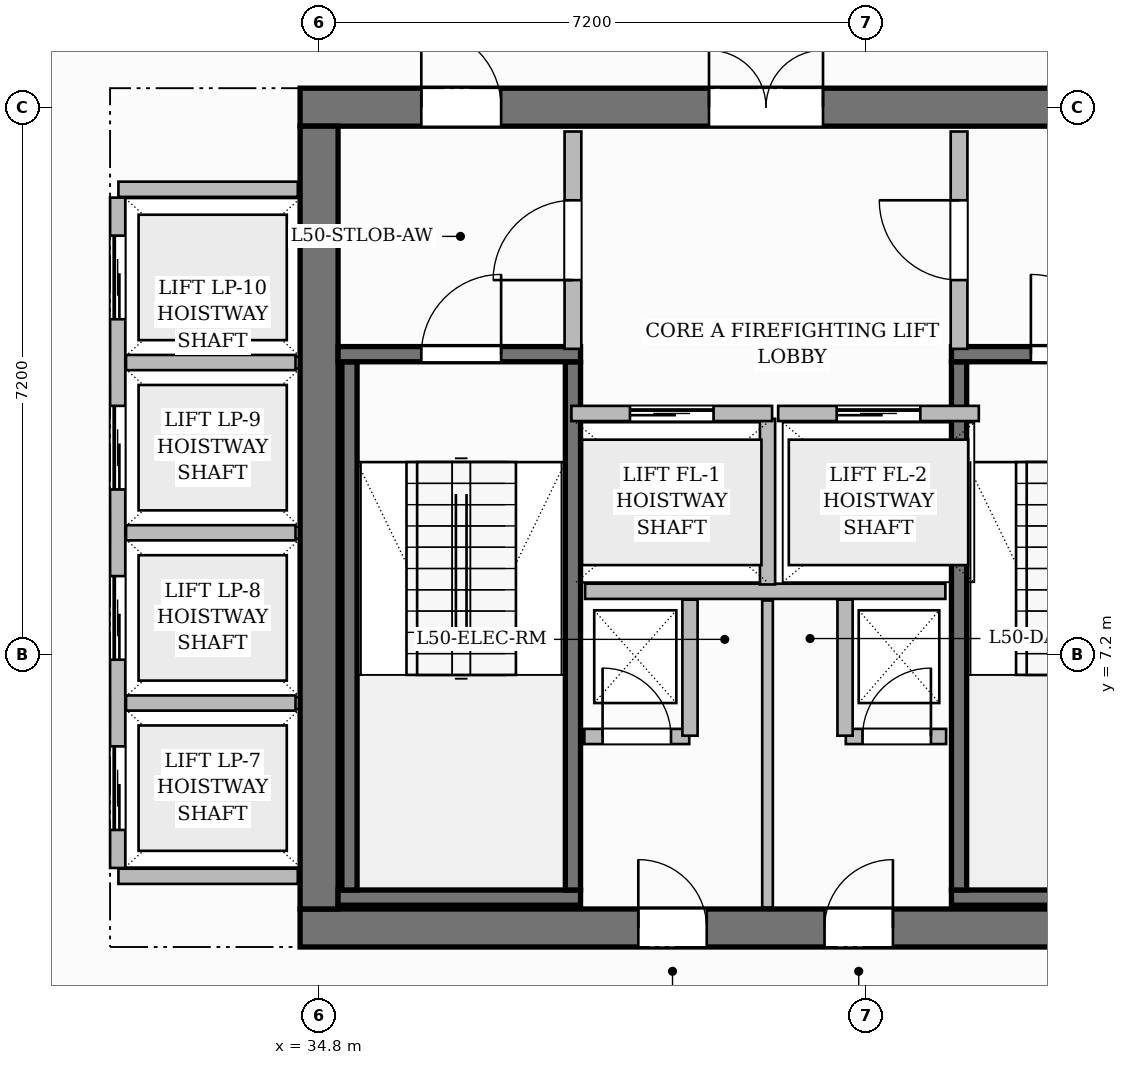
"""IFC4 building model, lengths in metres.
Left out: names, types, materials, properties, quantities, classifications, styles, units other than length and angle.
Written with IfcOpenShell. Run it as: python <this file> out.ifc"""

import sys

from ifc_helpers import new_model, si_unit, direction, frame, frame_2d, origin, place, context, subcontext, project, spatial, rectangle, extrude, source, transform, mapped, element, fill, save


model = new_model("IFC4")
c1 = context("Model", 3, precision=1e-05, world=origin(), true_north=direction((0.0, 1.0)))
c2 = subcontext(c1, "Body", "Model", "MODEL_VIEW")
j1 = project(units=[si_unit("LENGTHUNIT", "METRE"), si_unit("PLANEANGLEUNIT", "RADIAN")], contexts=[c1])
p1 = place(None, origin())
s1 = spatial("IfcSite", under=j1, at=p1, CompositionType="ELEMENT")
p2 = place(p1, origin())
s2 = spatial("IfcBuilding", under=s1, at=p2, CompositionType="ELEMENT")
p3 = place(p2, frame((0.0, 0.0, 201.9)))
s3 = spatial("IfcBuildingStorey", under=s2, at=p3, CompositionType="ELEMENT", Elevation=201.9)
p4 = place(p3, frame((34.55, 3.6, 0.0), z_axis=(0.0, 0.0, 1.0), x_axis=(1.0, 0.0, 0.0)))
e1 = element("IfcWall", 1, at=p4, inside=s3, PredefinedType="SHEAR", context=c2, shape_type="SweptSolid", body=[
    extrude(rectangle(XDim=15.5, YDim=0.5, at=frame_2d((7.75, 0.0))), origin(), (0.0, 0.0, 1.0), 3.85),
])
p5 = place(p4, frame((4.45, 0.0, 0.0)))
e2 = element("IfcOpeningElement", 2, at=p5, cuts=e1, PredefinedType="OPENING", context=c2, shape_type="SweptSolid", body=[
    extrude(rectangle(XDim=0.9, YDim=2.1, at=frame_2d((0.45, 1.05))), frame((0.0, 0.26, 0.0), z_axis=(0.0, -1.0, 0.0), x_axis=(1.0, 0.0, 0.0)), (0.0, 0.0, 1.0), 0.52),
])
p6 = place(p4, frame((6.9, 0.0, 0.0)))
e3 = element("IfcOpeningElement", 3, at=p6, cuts=e1, PredefinedType="OPENING", context=c2, shape_type="SweptSolid", body=[
    extrude(rectangle(XDim=0.9, YDim=2.1, at=frame_2d((0.45, 1.05))), frame((0.0, 0.26, 0.0), z_axis=(0.0, -1.0, 0.0), x_axis=(1.0, 0.0, 0.0)), (0.0, 0.0, 1.0), 0.52),
])
p7 = place(p3, frame((34.55, 14.4, 0.0), z_axis=(0.0, 0.0, 1.0), x_axis=(1.0, 0.0, 0.0)))
e4 = element("IfcWall", 4, at=p7, inside=s3, PredefinedType="SHEAR", context=c2, shape_type="SweptSolid", body=[
    extrude(rectangle(XDim=15.5, YDim=0.5, at=frame_2d((7.75, 0.0))), origin(), (0.0, 0.0, 1.0), 3.85),
])
p8 = place(p7, frame((5.38, 0.0, 0.0)))
e5 = element("IfcOpeningElement", 5, at=p8, cuts=e4, PredefinedType="OPENING", context=c2, shape_type="SweptSolid", body=[
    extrude(rectangle(XDim=1.5, YDim=2.2, at=frame_2d((0.75, 1.1))), frame((0.0, 0.26, 0.0), z_axis=(0.0, -1.0, 0.0), x_axis=(1.0, 0.0, 0.0)), (0.0, 0.0, 1.0), 0.52),
])
p9 = place(p7, frame((1.595, 0.0, 0.0)))
e6 = element("IfcOpeningElement", 6, at=p9, cuts=e4, PredefinedType="OPENING", context=c2, shape_type="SweptSolid", body=[
    extrude(rectangle(XDim=1.05, YDim=2.15, at=frame_2d((0.525, 1.075))), frame((0.0, 0.26, 0.0), z_axis=(0.0, -1.0, 0.0), x_axis=(1.0, 0.0, 0.0)), (0.0, 0.0, 1.0), 0.52),
])
p10 = place(p7, frame((11.225, 0.0, 0.0)))
e7 = element("IfcOpeningElement", 7, at=p10, cuts=e4, PredefinedType="OPENING", context=c2, shape_type="SweptSolid", body=[
    extrude(rectangle(XDim=1.05, YDim=2.15, at=frame_2d((0.525, 1.075))), frame((0.0, 0.26, 0.0), z_axis=(0.0, -1.0, 0.0), x_axis=(1.0, 0.0, 0.0)), (0.0, 0.0, 1.0), 0.52),
])
p11 = place(p3, frame((34.8, 3.85, 0.0), z_axis=(0.0, 0.0, 1.0), x_axis=(0.0, 1.0, 0.0)))
e8 = element("IfcWall", 8, at=p11, inside=s3, PredefinedType="SHEAR", context=c2, shape_type="SweptSolid", body=[
    extrude(rectangle(XDim=10.3, YDim=0.5, at=frame_2d((5.15, 0.0))), origin(), (0.0, 0.0, 1.0), 3.85),
])
p12 = place(p3, frame((35.05, 4.0, 0.0), z_axis=(0.0, 0.0, 1.0), x_axis=(1.0, 0.0, 0.0)))
e9 = element("IfcWall", 9, at=p12, inside=s3, PredefinedType="SHEAR", context=c2, shape_type="SweptSolid", body=[
    extrude(rectangle(XDim=3.19, YDim=0.2, at=frame_2d((1.595, 0.0))), origin(), (0.0, 0.0, 1.0), 3.85),
])
for number, where, z_axis, x_axis in (
    (10, (35.2, 4.1, 0.0), (0.0, 0.0, 1.0), (0.0, 1.0, 0.0)),
    (11, (38.14, 4.1, 0.0), (0.0, 0.0, 1.0), (0.0, 1.0, 0.0)),
):
    element("IfcWall", number, at=place(p3, frame(where, z_axis=z_axis, x_axis=x_axis)), inside=s3, PredefinedType="SHEAR", context=c2, shape_type="SweptSolid", body=[
        extrude(rectangle(XDim=6.95, YDim=0.2, at=frame_2d((3.475, 0.0))), origin(), (0.0, 0.0, 1.0), 3.85),
    ])
p13 = place(p3, frame((35.05, 11.15, 0.0), z_axis=(0.0, 0.0, 1.0), x_axis=(1.0, 0.0, 0.0)))
e12 = element("IfcWall", 12, at=p13, inside=s3, PredefinedType="SHEAR", context=c2, shape_type="SweptSolid", body=[
    extrude(rectangle(XDim=3.19, YDim=0.2, at=frame_2d((1.595, 0.0))), origin(), (0.0, 0.0, 1.0), 3.85),
])
p14 = place(p13, frame((1.095, 0.0, 0.0)))
e13 = element("IfcOpeningElement", 13, at=p14, cuts=e12, PredefinedType="OPENING", context=c2, shape_type="SweptSolid", body=[
    extrude(rectangle(XDim=1.05, YDim=2.2, at=frame_2d((0.525, 1.1))), frame((0.0, 0.11, 0.0), z_axis=(0.0, -1.0, 0.0), x_axis=(1.0, 0.0, 0.0)), (0.0, 0.0, 1.0), 0.22),
])
p15 = place(p3, frame((43.12, 4.0, 0.0), z_axis=(0.0, 0.0, 1.0), x_axis=(1.0, 0.0, 0.0)))
e14 = element("IfcWall", 14, at=p15, inside=s3, PredefinedType="SHEAR", context=c2, shape_type="SweptSolid", body=[
    extrude(rectangle(XDim=6.43, YDim=0.2, at=frame_2d((3.215, 0.0))), origin(), (0.0, 0.0, 1.0), 3.85),
])
p16 = place(p3, frame((43.22, 4.1, 0.0), z_axis=(0.0, 0.0, 1.0), x_axis=(0.0, 1.0, 0.0)))
e15 = element("IfcWall", 15, at=p16, inside=s3, PredefinedType="SHEAR", context=c2, shape_type="SweptSolid", body=[
    extrude(rectangle(XDim=6.95, YDim=0.2, at=frame_2d((3.475, 0.0))), origin(), (0.0, 0.0, 1.0), 3.85),
])
p17 = place(p3, frame((43.12, 11.15, 0.0), z_axis=(0.0, 0.0, 1.0), x_axis=(1.0, 0.0, 0.0)))
e16 = element("IfcWall", 16, at=p17, inside=s3, PredefinedType="SHEAR", context=c2, shape_type="SweptSolid", body=[
    extrude(rectangle(XDim=6.43, YDim=0.2, at=frame_2d((3.215, 0.0))), origin(), (0.0, 0.0, 1.0), 3.85),
])
p18 = place(p17, frame((1.045, 0.0, 0.0)))
e17 = element("IfcOpeningElement", 17, at=p18, cuts=e16, PredefinedType="OPENING", context=c2, shape_type="SweptSolid", body=[
    extrude(rectangle(XDim=1.05, YDim=2.2, at=frame_2d((0.525, 1.1))), frame((0.0, 0.11, 0.0), z_axis=(0.0, -1.0, 0.0), x_axis=(1.0, 0.0, 0.0)), (0.0, 0.0, 1.0), 0.22),
])
p19 = place(p17, frame((4.125, 0.0, 0.0)))
e18 = element("IfcOpeningElement", 18, at=p19, cuts=e16, PredefinedType="OPENING", context=c2, shape_type="SweptSolid", body=[
    extrude(rectangle(XDim=1.05, YDim=2.2, at=frame_2d((0.525, 1.1))), frame((0.0, 0.11, 0.0), z_axis=(0.0, -1.0, 0.0), x_axis=(1.0, 0.0, 0.0)), (0.0, 0.0, 1.0), 0.22),
])
p20 = place(p3, frame((38.3, 8.03, 0.0), z_axis=(0.0, 0.0, 1.0), x_axis=(1.0, 0.0, 0.0)))
e19 = element("IfcWall", 19, at=p20, inside=s3, PredefinedType="PARTITIONING", context=c2, shape_type="SweptSolid", body=[
    extrude(rectangle(XDim=4.74, YDim=0.2, at=frame_2d((2.37, 0.0))), origin(), (0.0, 0.0, 1.0), 3.6),
])
p21 = place(p3, frame((40.7, 8.12, 0.0), z_axis=(0.0, 0.0, 1.0), x_axis=(0.0, 1.0, 0.0)))
e20 = element("IfcWall", 20, at=p21, inside=s3, PredefinedType="PARTITIONING", context=c2, shape_type="SweptSolid", body=[
    extrude(rectangle(XDim=2.18, YDim=0.2, at=frame_2d((1.09, 0.0))), origin(), (0.0, 0.0, 1.0), 3.6),
])
p22 = place(p3, frame((38.14, 11.22, 0.0), z_axis=(0.0, 0.0, 1.0), x_axis=(0.0, 1.0, 0.0)))
e21 = element("IfcWall", 21, at=p22, inside=s3, PredefinedType="PARTITIONING", context=c2, shape_type="SweptSolid", body=[
    extrude(rectangle(XDim=2.86, YDim=0.22, at=frame_2d((1.43, 0.0))), origin(), (0.0, 0.0, 1.0), 3.6),
])
p23 = place(p22, frame((0.905, 0.0, 0.0)))
e22 = element("IfcOpeningElement", 22, at=p23, cuts=e21, PredefinedType="OPENING", context=c2, shape_type="SweptSolid", body=[
    extrude(rectangle(XDim=1.05, YDim=2.15, at=frame_2d((0.525, 1.075))), frame((0.0, 0.12, 0.0), z_axis=(0.0, -1.0, 0.0), x_axis=(1.0, 0.0, 0.0)), (0.0, 0.0, 1.0), 0.24),
])
p24 = place(p3, frame((43.22, 11.22, 0.0), z_axis=(0.0, 0.0, 1.0), x_axis=(0.0, 1.0, 0.0)))
e23 = element("IfcWall", 23, at=p24, inside=s3, PredefinedType="PARTITIONING", context=c2, shape_type="SweptSolid", body=[
    extrude(rectangle(XDim=2.86, YDim=0.22, at=frame_2d((1.43, 0.0))), origin(), (0.0, 0.0, 1.0), 3.6),
])
p25 = place(p24, frame((0.905, 0.0, 0.0)))
e24 = element("IfcOpeningElement", 24, at=p25, cuts=e23, PredefinedType="OPENING", context=c2, shape_type="SweptSolid", body=[
    extrude(rectangle(XDim=1.05, YDim=2.15, at=frame_2d((0.525, 1.075))), frame((0.0, 0.12, 0.0), z_axis=(0.0, -1.0, 0.0), x_axis=(1.0, 0.0, 0.0)), (0.0, 0.0, 1.0), 0.24),
])
p26 = place(p3, frame((38.29, 6.12, 0.0), z_axis=(0.0, 0.0, 1.0), x_axis=(1.0, 0.0, 0.0)))
e25 = element("IfcWall", 25, at=p26, inside=s3, PredefinedType="PARTITIONING", context=c2, shape_type="SweptSolid", body=[
    extrude(rectangle(XDim=1.38, YDim=0.2, at=frame_2d((0.69, 0.0))), origin(), (0.0, 0.0, 1.0), 3.6),
])
p27 = place(p26, frame((0.24, 0.0, 0.0)))
e26 = element("IfcOpeningElement", 26, at=p27, cuts=e25, PredefinedType="OPENING", context=c2, shape_type="SweptSolid", body=[
    extrude(rectangle(XDim=0.9, YDim=2.1, at=frame_2d((0.45, 1.05))), frame((0.0, 0.11, 0.0), z_axis=(0.0, -1.0, 0.0), x_axis=(1.0, 0.0, 0.0)), (0.0, 0.0, 1.0), 0.22),
])
p28 = place(p3, frame((39.68, 6.13, 0.0), z_axis=(0.0, 0.0, 1.0), x_axis=(0.0, 1.0, 0.0)))
e27 = element("IfcWall", 27, at=p28, inside=s3, PredefinedType="PARTITIONING", context=c2, shape_type="SweptSolid", body=[
    extrude(rectangle(XDim=1.79, YDim=0.2, at=frame_2d((0.895, 0.0))), origin(), (0.0, 0.0, 1.0), 3.6),
])
p29 = place(p3, frame((41.73, 6.12, 0.0), z_axis=(0.0, 0.0, 1.0), x_axis=(1.0, 0.0, 0.0)))
e28 = element("IfcWall", 28, at=p29, inside=s3, PredefinedType="PARTITIONING", context=c2, shape_type="SweptSolid", body=[
    extrude(rectangle(XDim=1.32, YDim=0.2, at=frame_2d((0.66, 0.0))), origin(), (0.0, 0.0, 1.0), 3.6),
])
p30 = place(p29, frame((0.22, 0.0, 0.0)))
e29 = element("IfcOpeningElement", 29, at=p30, cuts=e28, PredefinedType="OPENING", context=c2, shape_type="SweptSolid", body=[
    extrude(rectangle(XDim=0.9, YDim=2.1, at=frame_2d((0.45, 1.05))), frame((0.0, 0.11, 0.0), z_axis=(0.0, -1.0, 0.0), x_axis=(1.0, 0.0, 0.0)), (0.0, 0.0, 1.0), 0.22),
])
p31 = place(p3, frame((41.72, 6.13, 0.0), z_axis=(0.0, 0.0, 1.0), x_axis=(0.0, 1.0, 0.0)))
e30 = element("IfcWall", 30, at=p31, inside=s3, PredefinedType="PARTITIONING", context=c2, shape_type="SweptSolid", body=[
    extrude(rectangle(XDim=1.79, YDim=0.2, at=frame_2d((0.895, 0.0))), origin(), (0.0, 0.0, 1.0), 3.6),
])
p32 = place(p3, frame((40.7, 3.87, 0.0), z_axis=(0.0, 0.0, 1.0), x_axis=(0.0, 1.0, 0.0)))
e31 = element("IfcWall", 31, at=p32, inside=s3, PredefinedType="PARTITIONING", context=c2, shape_type="SweptSolid", body=[
    extrude(rectangle(XDim=4.04, YDim=0.14, at=frame_2d((2.02, 0.0))), origin(), (0.0, 0.0, 1.0), 3.6),
])
for number, where, z_axis, x_axis in (
    (32, (32.16, 4.28, 0.0), (0.0, 0.0, 1.0), (1.0, 0.0, 0.0)),
    (33, (32.16, 13.32, 0.0), (0.0, 0.0, 1.0), (1.0, 0.0, 0.0)),
):
    element("IfcWall", number, at=place(p3, frame(where, z_axis=z_axis, x_axis=x_axis)), inside=s3, PredefinedType="PARTITIONING", context=c2, shape_type="SweptSolid", body=[
        extrude(rectangle(XDim=2.36, YDim=0.2, at=frame_2d((1.18, 0.0))), origin(), (0.0, 0.0, 1.0), 3.6),
    ])
p33 = place(p3, frame((32.15, 4.39, 0.0), z_axis=(0.0, 0.0, 1.0), x_axis=(0.0, 1.0, 0.0)))
e34 = element("IfcWall", 34, at=p33, inside=s3, PredefinedType="PARTITIONING", context=c2, shape_type="SweptSolid", body=[
    extrude(rectangle(XDim=8.82, YDim=0.2, at=frame_2d((4.41, 0.0))), origin(), (0.0, 0.0, 1.0), 3.6),
])
p34 = place(p33, frame((0.5, 0.0, 0.0)))
e35 = element("IfcOpeningElement", 35, at=p34, cuts=e34, PredefinedType="OPENING", context=c2, shape_type="SweptSolid", body=[
    extrude(rectangle(XDim=1.1, YDim=2.2, at=frame_2d((0.55, 1.1))), frame((0.0, 0.11, 0.0), z_axis=(0.0, -1.0, 0.0), x_axis=(1.0, 0.0, 0.0)), (0.0, 0.0, 1.0), 0.22),
])
p35 = place(p33, frame((2.74, 0.0, 0.0)))
e36 = element("IfcOpeningElement", 36, at=p35, cuts=e34, PredefinedType="OPENING", context=c2, shape_type="SweptSolid", body=[
    extrude(rectangle(XDim=1.1, YDim=2.2, at=frame_2d((0.55, 1.1))), frame((0.0, 0.11, 0.0), z_axis=(0.0, -1.0, 0.0), x_axis=(1.0, 0.0, 0.0)), (0.0, 0.0, 1.0), 0.22),
])
p36 = place(p33, frame((4.98, 0.0, 0.0)))
e37 = element("IfcOpeningElement", 37, at=p36, cuts=e34, PredefinedType="OPENING", context=c2, shape_type="SweptSolid", body=[
    extrude(rectangle(XDim=1.1, YDim=2.2, at=frame_2d((0.55, 1.1))), frame((0.0, 0.11, 0.0), z_axis=(0.0, -1.0, 0.0), x_axis=(1.0, 0.0, 0.0)), (0.0, 0.0, 1.0), 0.22),
])
p37 = place(p33, frame((7.22, 0.0, 0.0)))
e38 = element("IfcOpeningElement", 38, at=p37, cuts=e34, PredefinedType="OPENING", context=c2, shape_type="SweptSolid", body=[
    extrude(rectangle(XDim=1.1, YDim=2.2, at=frame_2d((0.55, 1.1))), frame((0.0, 0.11, 0.0), z_axis=(0.0, -1.0, 0.0), x_axis=(1.0, 0.0, 0.0)), (0.0, 0.0, 1.0), 0.22),
])
for number, where, z_axis, x_axis in (
    (39, (32.26, 6.56, 0.0), (0.0, 0.0, 1.0), (1.0, 0.0, 0.0)),
    (40, (32.26, 8.8, 0.0), (0.0, 0.0, 1.0), (1.0, 0.0, 0.0)),
    (41, (32.26, 11.04, 0.0), (0.0, 0.0, 1.0), (1.0, 0.0, 0.0)),
):
    element("IfcWall", number, at=place(p3, frame(where, z_axis=z_axis, x_axis=x_axis)), inside=s3, PredefinedType="PARTITIONING", context=c2, shape_type="SweptSolid", body=[
        extrude(rectangle(XDim=2.23, YDim=0.2, at=frame_2d((1.115, 0.0))), origin(), (0.0, 0.0, 1.0), 3.6),
    ])
p38 = place(p3, frame((38.12, 10.37, 0.0), z_axis=(0.0, 0.0, 1.0), x_axis=(1.0, 0.0, 0.0)))
e42 = element("IfcWall", 42, at=p38, inside=s3, PredefinedType="PARTITIONING", context=c2, shape_type="SweptSolid", body=[
    extrude(rectangle(XDim=2.64, YDim=0.2, at=frame_2d((1.32, 0.0))), origin(), (0.0, 0.0, 1.0), 3.6),
])
p39 = place(p38, frame((0.77, 0.0, 0.0)))
e43 = element("IfcOpeningElement", 43, at=p39, cuts=e42, PredefinedType="OPENING", context=c2, shape_type="SweptSolid", body=[
    extrude(rectangle(XDim=1.1, YDim=2.2, at=frame_2d((0.55, 1.1))), frame((0.0, 0.11, 0.0), z_axis=(0.0, -1.0, 0.0), x_axis=(1.0, 0.0, 0.0)), (0.0, 0.0, 1.0), 0.22),
])
p40 = place(p3, frame((40.84, 10.37, 0.0), z_axis=(0.0, 0.0, 1.0), x_axis=(1.0, 0.0, 0.0)))
e44 = element("IfcWall", 44, at=p40, inside=s3, PredefinedType="PARTITIONING", context=c2, shape_type="SweptSolid", body=[
    extrude(rectangle(XDim=2.64, YDim=0.2, at=frame_2d((1.32, 0.0))), origin(), (0.0, 0.0, 1.0), 3.6),
])
p41 = place(p40, frame((0.77, 0.0, 0.0)))
e45 = element("IfcOpeningElement", 45, at=p41, cuts=e44, PredefinedType="OPENING", context=c2, shape_type="SweptSolid", body=[
    extrude(rectangle(XDim=1.1, YDim=2.2, at=frame_2d((0.55, 1.1))), frame((0.0, 0.11, 0.0), z_axis=(0.0, -1.0, 0.0), x_axis=(1.0, 0.0, 0.0)), (0.0, 0.0, 1.0), 0.22),
])
m1 = source(origin(), c2, "Body", "SweptSolid", [
    extrude(rectangle(XDim=1.05, YDim=2.2, at=frame_2d((0.525, 1.1))), frame((0.0, 0.025, 0.0), z_axis=(0.0, -1.0, 0.0), x_axis=(1.0, 0.0, 0.0)), (0.0, 0.0, 1.0), 0.05),
])
p42 = place(p14, origin())
e46 = element("IfcDoor", 46, at=p42, inside=s3, OperationType="SINGLE_SWING_RIGHT", PredefinedType="DOOR", context=c2, shape_type="MappedRepresentation", body=[
    mapped(m1, transform((0.0, 0.0, 0.0), scale=1.0)),
])
fill(e13, e46)
p43 = place(p18, origin())
e47 = element("IfcDoor", 47, at=p43, inside=s3, OperationType="SINGLE_SWING_LEFT", PredefinedType="DOOR", context=c2, shape_type="MappedRepresentation", body=[
    mapped(m1, transform((0.0, 0.0, 0.0), scale=1.0)),
])
fill(e17, e47)
m2 = source(origin(), c2, "Body", "SweptSolid", [
    extrude(rectangle(XDim=1.05, YDim=2.15, at=frame_2d((0.525, 1.075))), frame((0.0, 0.025, 0.0), z_axis=(0.0, -1.0, 0.0), x_axis=(1.0, 0.0, 0.0)), (0.0, 0.0, 1.0), 0.05),
])
p44 = place(p23, origin())
e48 = element("IfcDoor", 48, at=p44, inside=s3, OperationType="SINGLE_SWING_LEFT", PredefinedType="DOOR", context=c2, shape_type="MappedRepresentation", body=[
    mapped(m2, transform((0.0, 0.0, 0.0), scale=1.0)),
])
fill(e22, e48)
p45 = place(p25, origin())
e49 = element("IfcDoor", 49, at=p45, inside=s3, OperationType="SINGLE_SWING_RIGHT", PredefinedType="DOOR", context=c2, shape_type="MappedRepresentation", body=[
    mapped(m2, transform((0.0, 0.0, 0.0), scale=1.0)),
])
fill(e24, e49)
m3 = source(origin(), c2, "Body", "SweptSolid", [
    extrude(rectangle(XDim=1.5, YDim=2.2, at=frame_2d((0.75, 1.1))), frame((0.0, 0.025, 0.0), z_axis=(0.0, -1.0, 0.0), x_axis=(1.0, 0.0, 0.0)), (0.0, 0.0, 1.0), 0.05),
])
p46 = place(p8, origin())
e50 = element("IfcDoor", 50, at=p46, inside=s3, OperationType="DOUBLE_DOOR_SINGLE_SWING", PredefinedType="DOOR", context=c2, shape_type="MappedRepresentation", body=[
    mapped(m3, transform((0.0, 0.0, 0.0), scale=1.0)),
])
fill(e5, e50)
p47 = place(p9, origin())
e51 = element("IfcDoor", 51, at=p47, inside=s3, OperationType="SINGLE_SWING_LEFT", PredefinedType="DOOR", context=c2, shape_type="MappedRepresentation", body=[
    mapped(m2, transform((0.0, 0.0, 0.0), scale=1.0)),
])
fill(e6, e51)
m4 = source(origin(), c2, "Body", "SweptSolid", [
    extrude(rectangle(XDim=0.9, YDim=2.1, at=frame_2d((0.45, 1.05))), frame((0.0, 0.025, 0.0), z_axis=(0.0, -1.0, 0.0), x_axis=(1.0, 0.0, 0.0)), (0.0, 0.0, 1.0), 0.05),
])
p48 = place(p27, origin())
e52 = element("IfcDoor", 52, at=p48, inside=s3, OperationType="SINGLE_SWING_LEFT", PredefinedType="DOOR", context=c2, shape_type="MappedRepresentation", body=[
    mapped(m4, transform((0.0, 0.0, 0.0), scale=1.0)),
])
fill(e26, e52)
p49 = place(p30, origin())
e53 = element("IfcDoor", 53, at=p49, inside=s3, OperationType="SINGLE_SWING_RIGHT", PredefinedType="DOOR", context=c2, shape_type="MappedRepresentation", body=[
    mapped(m4, transform((0.0, 0.0, 0.0), scale=1.0)),
])
fill(e29, e53)
p50 = place(p5, origin())
e54 = element("IfcDoor", 54, at=p50, inside=s3, OperationType="SINGLE_SWING_LEFT", PredefinedType="DOOR", context=c2, shape_type="MappedRepresentation", body=[
    mapped(m4, transform((0.0, 0.0, 0.0), scale=1.0)),
])
fill(e2, e54)
p51 = place(p6, origin())
e55 = element("IfcDoor", 55, at=p51, inside=s3, OperationType="SINGLE_SWING_RIGHT", PredefinedType="DOOR", context=c2, shape_type="MappedRepresentation", body=[
    mapped(m4, transform((0.0, 0.0, 0.0), scale=1.0)),
])
fill(e3, e55)
m5 = source(origin(), c2, "Body", "SweptSolid", [
    extrude(rectangle(XDim=1.1, YDim=2.2, at=frame_2d((0.55, 1.1))), frame((0.0, 0.025, 0.0), z_axis=(0.0, -1.0, 0.0), x_axis=(1.0, 0.0, 0.0)), (0.0, 0.0, 1.0), 0.05),
])
p52 = place(p39, origin())
e56 = element("IfcDoor", 56, at=p52, inside=s3, OperationType="SLIDING_TO_LEFT", PredefinedType="DOOR", context=c2, shape_type="MappedRepresentation", body=[
    mapped(m5, transform((0.0, 0.0, 0.0), scale=1.0)),
])
fill(e43, e56)
p53 = place(p41, origin())
e57 = element("IfcDoor", 57, at=p53, inside=s3, OperationType="SLIDING_TO_LEFT", PredefinedType="DOOR", context=c2, shape_type="MappedRepresentation", body=[
    mapped(m5, transform((0.0, 0.0, 0.0), scale=1.0)),
])
fill(e45, e57)
p54 = place(p34, origin())
e58 = element("IfcDoor", 58, at=p54, inside=s3, OperationType="SLIDING_TO_LEFT", PredefinedType="DOOR", context=c2, shape_type="MappedRepresentation", body=[
    mapped(m5, transform((0.0, 0.0, 0.0), scale=1.0)),
])
fill(e35, e58)
p55 = place(p35, origin())
e59 = element("IfcDoor", 59, at=p55, inside=s3, OperationType="SLIDING_TO_LEFT", PredefinedType="DOOR", context=c2, shape_type="MappedRepresentation", body=[
    mapped(m5, transform((0.0, 0.0, 0.0), scale=1.0)),
])
fill(e36, e59)
p56 = place(p36, origin())
e60 = element("IfcDoor", 60, at=p56, inside=s3, OperationType="SLIDING_TO_LEFT", PredefinedType="DOOR", context=c2, shape_type="MappedRepresentation", body=[
    mapped(m5, transform((0.0, 0.0, 0.0), scale=1.0)),
])
fill(e37, e60)
p57 = place(p37, origin())
e61 = element("IfcDoor", 61, at=p57, inside=s3, OperationType="SLIDING_TO_LEFT", PredefinedType="DOOR", context=c2, shape_type="MappedRepresentation", body=[
    mapped(m5, transform((0.0, 0.0, 0.0), scale=1.0)),
])
fill(e38, e61)
save(model, sys.argv[1])
